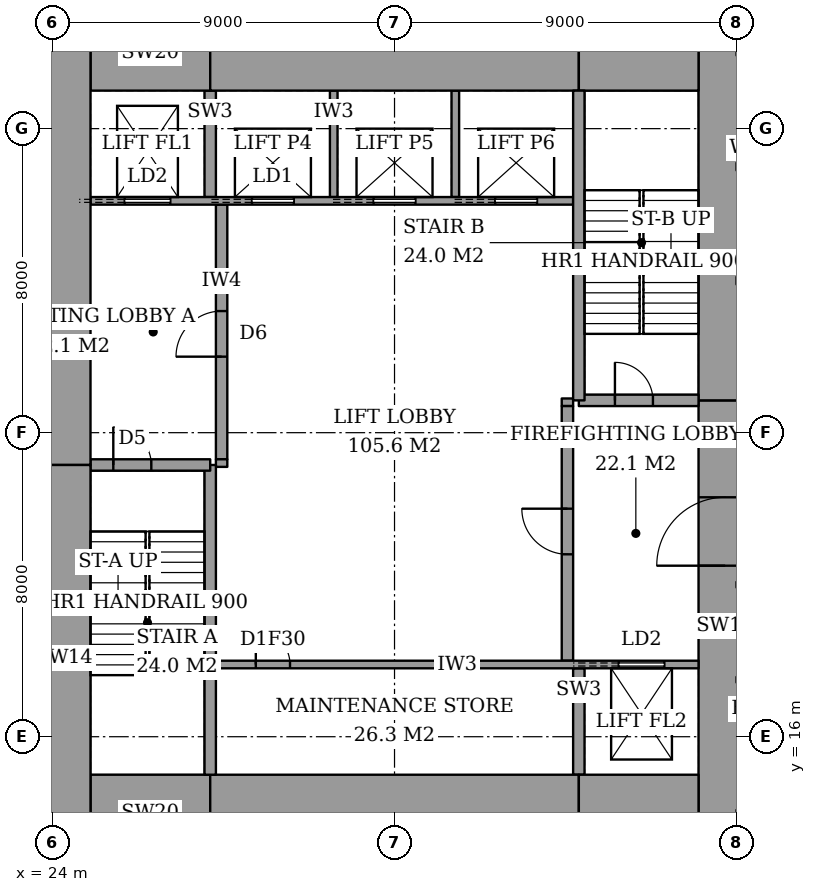
"""IFC4 building model, lengths in metres.
Left out: names, types, materials, properties, quantities, classifications, styles, units other than length and angle.
Written with IfcOpenShell. Run it as: python <this file> out.ifc"""

import sys

from ifc_helpers import new_model, si_unit, direction, frame, frame_2d, origin, place, context, subcontext, project, spatial, rectangle, extrude, element, fill, save


model = new_model("IFC4")
c1 = context("Model", 3, precision=1e-05, world=origin(), true_north=direction((0.0, 1.0)))
c2 = subcontext(c1, "Body", "Model", "MODEL_VIEW")
j1 = project(units=[si_unit("LENGTHUNIT", "METRE"), si_unit("PLANEANGLEUNIT", "RADIAN")], contexts=[c1])
p1 = place(None, origin())
s1 = spatial("IfcSite", under=j1, at=p1, CompositionType="ELEMENT")
p2 = place(p1, origin())
s2 = spatial("IfcBuilding", under=s1, at=p2, CompositionType="ELEMENT")
p3 = place(p2, frame((0.0, 0.0, 277.2)))
s3 = spatial("IfcBuildingStorey", under=s2, at=p3, CompositionType="ELEMENT", Elevation=277.2)
p4 = place(p3, frame((25.0, 14.0, 0.0), z_axis=(0.0, 0.0, 1.0), x_axis=(1.0, 0.0, 0.0)))
e1 = element("IfcWall", 1, at=p4, inside=s3, PredefinedType="SHEAR", context=c2, shape_type="SweptSolid", body=[
    extrude(rectangle(XDim=3.15, YDim=2.0, at=frame_2d((1.575, 0.0))), origin(), (0.0, 0.0, 1.0), 5.4),
])
p5 = place(p3, frame((28.15, 14.0, 0.0), z_axis=(0.0, 0.0, 1.0), x_axis=(1.0, 0.0, 0.0)))
e2 = element("IfcWall", 2, at=p5, inside=s3, PredefinedType="SHEAR", context=c2, shape_type="SweptSolid", body=[
    extrude(rectangle(XDim=9.7, YDim=2.0, at=frame_2d((4.85, 0.0))), origin(), (0.0, 0.0, 1.0), 5.4),
])
for number, where, z_axis, x_axis in (
    (3, (37.85, 14.0, 0.0), (0.0, 0.0, 1.0), (1.0, 0.0, 0.0)),
    (4, (25.0, 34.0, 0.0), (0.0, 0.0, 1.0), (1.0, 0.0, 0.0)),
):
    element("IfcWall", number, at=place(p3, frame(where, z_axis=z_axis, x_axis=x_axis)), inside=s3, PredefinedType="SHEAR", context=c2, shape_type="SweptSolid", body=[
        extrude(rectangle(XDim=3.15, YDim=2.0, at=frame_2d((1.575, 0.0))), origin(), (0.0, 0.0, 1.0), 5.4),
    ])
p6 = place(p3, frame((28.15, 34.0, 0.0), z_axis=(0.0, 0.0, 1.0), x_axis=(1.0, 0.0, 0.0)))
e5 = element("IfcWall", 5, at=p6, inside=s3, PredefinedType="SHEAR", context=c2, shape_type="SweptSolid", body=[
    extrude(rectangle(XDim=9.7, YDim=2.0, at=frame_2d((4.85, 0.0))), origin(), (0.0, 0.0, 1.0), 5.4),
])
p7 = place(p3, frame((37.85, 34.0, 0.0), z_axis=(0.0, 0.0, 1.0), x_axis=(1.0, 0.0, 0.0)))
e6 = element("IfcWall", 6, at=p7, inside=s3, PredefinedType="SHEAR", context=c2, shape_type="SweptSolid", body=[
    extrude(rectangle(XDim=3.15, YDim=2.0, at=frame_2d((1.575, 0.0))), origin(), (0.0, 0.0, 1.0), 5.4),
])
p8 = place(p3, frame((24.3, 13.0, 0.0), z_axis=(0.0, 0.0, 1.0), x_axis=(0.0, 1.0, 0.0)))
e7 = element("IfcWall", 7, at=p8, inside=s3, PredefinedType="SHEAR", context=c2, shape_type="SweptSolid", body=[
    extrude(rectangle(XDim=10.15, YDim=1.4, at=frame_2d((5.075, 0.0))), origin(), (0.0, 0.0, 1.0), 5.4),
])
p9 = place(p3, frame((24.3, 23.15, 0.0), z_axis=(0.0, 0.0, 1.0), x_axis=(0.0, 1.0, 0.0)))
e8 = element("IfcWall", 8, at=p9, inside=s3, PredefinedType="SHEAR", context=c2, shape_type="SweptSolid", body=[
    extrude(rectangle(XDim=11.85, YDim=1.4, at=frame_2d((5.925, 0.0))), origin(), (0.0, 0.0, 1.0), 5.4),
])
p10 = place(p3, frame((41.7, 13.0, 0.0), z_axis=(0.0, 0.0, 1.0), x_axis=(0.0, 1.0, 0.0)))
e9 = element("IfcWall", 9, at=p10, inside=s3, PredefinedType="SHEAR", context=c2, shape_type="SweptSolid", body=[
    extrude(rectangle(XDim=11.85, YDim=1.4, at=frame_2d((5.925, 0.0))), origin(), (0.0, 0.0, 1.0), 5.4),
])
p11 = place(p10, frame((7.5, 0.0, 0.0)))
e10 = element("IfcOpeningElement", 10, at=p11, cuts=e9, PredefinedType="OPENING", context=c2, shape_type="SweptSolid", body=[
    extrude(rectangle(XDim=1.8, YDim=2.4, at=frame_2d((0.9, 1.2))), frame((0.0, 0.71, 0.0), z_axis=(0.0, -1.0, 0.0), x_axis=(1.0, 0.0, 0.0)), (0.0, 0.0, 1.0), 1.42),
])
p12 = place(p3, frame((41.7, 24.85, 0.0), z_axis=(0.0, 0.0, 1.0), x_axis=(0.0, 1.0, 0.0)))
e11 = element("IfcWall", 11, at=p12, inside=s3, PredefinedType="SHEAR", context=c2, shape_type="SweptSolid", body=[
    extrude(rectangle(XDim=10.15, YDim=1.4, at=frame_2d((5.075, 0.0))), origin(), (0.0, 0.0, 1.0), 5.4),
])
p13 = place(p3, frame((28.15, 15.0, 0.0), z_axis=(0.0, 0.0, 1.0), x_axis=(0.0, 1.0, 0.0)))
e12 = element("IfcWall", 12, at=p13, inside=s3, PredefinedType="SHEAR", context=c2, shape_type="SweptSolid", body=[
    extrude(rectangle(XDim=8.15, YDim=0.3, at=frame_2d((4.075, 0.0))), origin(), (0.0, 0.0, 1.0), 5.4),
])
p14 = place(p3, frame((25.0, 23.15, 0.0), z_axis=(0.0, 0.0, 1.0), x_axis=(1.0, 0.0, 0.0)))
e13 = element("IfcWall", 13, at=p14, inside=s3, PredefinedType="SHEAR", context=c2, shape_type="SweptSolid", body=[
    extrude(rectangle(XDim=3.15, YDim=0.3, at=frame_2d((1.575, 0.0))), origin(), (0.0, 0.0, 1.0), 5.4),
])
p15 = place(p14, frame((0.6, 0.0, 0.0)))
e14 = element("IfcOpeningElement", 14, at=p15, cuts=e13, PredefinedType="OPENING", context=c2, shape_type="SweptSolid", body=[
    extrude(rectangle(XDim=1.0, YDim=2.1, at=frame_2d((0.5, 1.05))), frame((0.0, 0.16, 0.0), z_axis=(0.0, -1.0, 0.0), x_axis=(1.0, 0.0, 0.0)), (0.0, 0.0, 1.0), 0.32),
])
p16 = place(p3, frame((37.85, 24.85, 0.0), z_axis=(0.0, 0.0, 1.0), x_axis=(0.0, 1.0, 0.0)))
e15 = element("IfcWall", 15, at=p16, inside=s3, PredefinedType="SHEAR", context=c2, shape_type="SweptSolid", body=[
    extrude(rectangle(XDim=8.15, YDim=0.3, at=frame_2d((4.075, 0.0))), origin(), (0.0, 0.0, 1.0), 5.4),
])
p17 = place(p3, frame((37.85, 24.85, 0.0), z_axis=(0.0, 0.0, 1.0), x_axis=(1.0, 0.0, 0.0)))
e16 = element("IfcWall", 16, at=p17, inside=s3, PredefinedType="SHEAR", context=c2, shape_type="SweptSolid", body=[
    extrude(rectangle(XDim=3.15, YDim=0.3, at=frame_2d((1.575, 0.0))), origin(), (0.0, 0.0, 1.0), 5.4),
])
p18 = place(p17, frame((0.95, 0.0, 0.0)))
e17 = element("IfcOpeningElement", 17, at=p18, cuts=e16, PredefinedType="OPENING", context=c2, shape_type="SweptSolid", body=[
    extrude(rectangle(XDim=1.0, YDim=2.1, at=frame_2d((0.5, 1.05))), frame((0.0, 0.16, 0.0), z_axis=(0.0, -1.0, 0.0), x_axis=(1.0, 0.0, 0.0)), (0.0, 0.0, 1.0), 0.32),
])
p19 = place(p3, frame((28.45, 23.3, 0.0), z_axis=(0.0, 0.0, 1.0), x_axis=(0.0, 1.0, 0.0)))
e18 = element("IfcWall", 18, at=p19, inside=s3, PredefinedType="PARTITIONING", context=c2, shape_type="SweptSolid", body=[
    extrude(rectangle(XDim=6.7, YDim=0.3, at=frame_2d((3.35, 0.0))), origin(), (0.0, 0.0, 1.0), 5.4),
])
p20 = place(p19, frame((2.7, 0.0, 0.0)))
e19 = element("IfcOpeningElement", 19, at=p20, cuts=e18, PredefinedType="OPENING", context=c2, shape_type="SweptSolid", body=[
    extrude(rectangle(XDim=1.2, YDim=2.1, at=frame_2d((0.6, 1.05))), frame((0.0, 0.16, 0.0), z_axis=(0.0, -1.0, 0.0), x_axis=(1.0, 0.0, 0.0)), (0.0, 0.0, 1.0), 0.32),
])
p21 = place(p3, frame((37.55, 18.0, 0.0), z_axis=(0.0, 0.0, 1.0), x_axis=(0.0, 1.0, 0.0)))
e20 = element("IfcWall", 20, at=p21, inside=s3, PredefinedType="PARTITIONING", context=c2, shape_type="SweptSolid", body=[
    extrude(rectangle(XDim=6.7, YDim=0.3, at=frame_2d((3.35, 0.0))), origin(), (0.0, 0.0, 1.0), 5.4),
])
p22 = place(p21, frame((2.8, 0.0, 0.0)))
e21 = element("IfcOpeningElement", 21, at=p22, cuts=e20, PredefinedType="OPENING", context=c2, shape_type="SweptSolid", body=[
    extrude(rectangle(XDim=1.2, YDim=2.1, at=frame_2d((0.6, 1.05))), frame((0.0, 0.16, 0.0), z_axis=(0.0, -1.0, 0.0), x_axis=(1.0, 0.0, 0.0)), (0.0, 0.0, 1.0), 0.32),
])
p23 = place(p3, frame((28.3, 17.9, 0.0), z_axis=(0.0, 0.0, 1.0), x_axis=(1.0, 0.0, 0.0)))
e22 = element("IfcWall", 22, at=p23, inside=s3, PredefinedType="PARTITIONING", context=c2, shape_type="SweptSolid", body=[
    extrude(rectangle(XDim=12.7, YDim=0.2, at=frame_2d((6.35, 0.0))), origin(), (0.0, 0.0, 1.0), 5.4),
])
p24 = place(p23, frame((1.05, 0.0, 0.0)))
e23 = element("IfcOpeningElement", 23, at=p24, cuts=e22, PredefinedType="OPENING", context=c2, shape_type="SweptSolid", body=[
    extrude(rectangle(XDim=0.9, YDim=2.1, at=frame_2d((0.45, 1.05))), frame((0.0, 0.11, 0.0), z_axis=(0.0, -1.0, 0.0), x_axis=(1.0, 0.0, 0.0)), (0.0, 0.0, 1.0), 0.22),
])
p25 = place(p23, frame((10.6, 0.0, 0.0)))
e24 = element("IfcOpeningElement", 24, at=p25, cuts=e22, PredefinedType="OPENING", context=c2, shape_type="SweptSolid", body=[
    extrude(rectangle(XDim=1.2, YDim=2.1, at=frame_2d((0.6, 1.05))), frame((0.0, 0.11, 0.0), z_axis=(0.0, -1.0, 0.0), x_axis=(1.0, 0.0, 0.0)), (0.0, 0.0, 1.0), 0.22),
])
p26 = place(p3, frame((25.0, 30.1, 0.0), z_axis=(0.0, 0.0, 1.0), x_axis=(1.0, 0.0, 0.0)))
e25 = element("IfcWall", 25, at=p26, inside=s3, PredefinedType="PARTITIONING", context=c2, shape_type="SweptSolid", body=[
    extrude(rectangle(XDim=12.7, YDim=0.2, at=frame_2d((6.35, 0.0))), origin(), (0.0, 0.0, 1.0), 5.4),
])
p27 = place(p26, frame((4.25, 0.0, 0.0)))
e26 = element("IfcOpeningElement", 26, at=p27, cuts=e25, PredefinedType="OPENING", context=c2, shape_type="SweptSolid", body=[
    extrude(rectangle(XDim=1.1, YDim=2.1, at=frame_2d((0.55, 1.05))), frame((0.0, 0.11, 0.0), z_axis=(0.0, -1.0, 0.0), x_axis=(1.0, 0.0, 0.0)), (0.0, 0.0, 1.0), 0.22),
])
p28 = place(p26, frame((7.45, 0.0, 0.0)))
e27 = element("IfcOpeningElement", 27, at=p28, cuts=e25, PredefinedType="OPENING", context=c2, shape_type="SweptSolid", body=[
    extrude(rectangle(XDim=1.1, YDim=2.1, at=frame_2d((0.55, 1.05))), frame((0.0, 0.11, 0.0), z_axis=(0.0, -1.0, 0.0), x_axis=(1.0, 0.0, 0.0)), (0.0, 0.0, 1.0), 0.22),
])
p29 = place(p26, frame((10.65, 0.0, 0.0)))
e28 = element("IfcOpeningElement", 28, at=p29, cuts=e25, PredefinedType="OPENING", context=c2, shape_type="SweptSolid", body=[
    extrude(rectangle(XDim=1.1, YDim=2.1, at=frame_2d((0.55, 1.05))), frame((0.0, 0.11, 0.0), z_axis=(0.0, -1.0, 0.0), x_axis=(1.0, 0.0, 0.0)), (0.0, 0.0, 1.0), 0.22),
])
p30 = place(p26, frame((0.9, 0.0, 0.0)))
e29 = element("IfcOpeningElement", 29, at=p30, cuts=e25, PredefinedType="OPENING", context=c2, shape_type="SweptSolid", body=[
    extrude(rectangle(XDim=1.2, YDim=2.1, at=frame_2d((0.6, 1.05))), frame((0.0, 0.11, 0.0), z_axis=(0.0, -1.0, 0.0), x_axis=(1.0, 0.0, 0.0)), (0.0, 0.0, 1.0), 0.22),
])
p31 = place(p3, frame((37.85, 15.0, 0.0), z_axis=(0.0, 0.0, 1.0), x_axis=(0.0, 1.0, 0.0)))
e30 = element("IfcWall", 30, at=p31, inside=s3, PredefinedType="SHEAR", context=c2, shape_type="SweptSolid", body=[
    extrude(rectangle(XDim=2.8, YDim=0.3, at=frame_2d((1.4, 0.0))), origin(), (0.0, 0.0, 1.0), 5.4),
])
for number, where, z_axis, x_axis in (
    (31, (31.4, 30.2, 0.0), (0.0, 0.0, 1.0), (0.0, 1.0, 0.0)),
    (32, (34.6, 30.2, 0.0), (0.0, 0.0, 1.0), (0.0, 1.0, 0.0)),
):
    element("IfcWall", number, at=place(p3, frame(where, z_axis=z_axis, x_axis=x_axis)), inside=s3, PredefinedType="PARTITIONING", context=c2, shape_type="SweptSolid", body=[
        extrude(rectangle(XDim=2.8, YDim=0.2, at=frame_2d((1.4, 0.0))), origin(), (0.0, 0.0, 1.0), 5.4),
    ])
p32 = place(p3, frame((28.15, 30.2, 0.0), z_axis=(0.0, 0.0, 1.0), x_axis=(0.0, 1.0, 0.0)))
e33 = element("IfcWall", 33, at=p32, inside=s3, PredefinedType="SHEAR", context=c2, shape_type="SweptSolid", body=[
    extrude(rectangle(XDim=2.8, YDim=0.3, at=frame_2d((1.4, 0.0))), origin(), (0.0, 0.0, 1.0), 5.4),
])
for number, where, z_axis, x_axis in (
    (34, (28.3, 23.2, 0.0), (0.0, 0.0, 1.0), (1.0, 0.0, 0.0)),
    (35, (37.4, 24.8, 0.0), (0.0, 0.0, 1.0), (1.0, 0.0, 0.0)),
):
    element("IfcWall", number, at=place(p3, frame(where, z_axis=z_axis, x_axis=x_axis)), inside=s3, PredefinedType="PARTITIONING", context=c2, shape_type="SweptSolid", body=[
        extrude(rectangle(XDim=0.3, YDim=0.2, at=frame_2d((0.15, 0.0))), origin(), (0.0, 0.0, 1.0), 5.4),
    ])
p33 = place(p15, origin())
e36 = element("IfcDoor", 36, at=p33, inside=s3, OperationType="SINGLE_SWING_RIGHT", PredefinedType="DOOR", context=c2, shape_type="SweptSolid", body=[
    extrude(rectangle(XDim=1.0, YDim=2.1, at=frame_2d((0.5, 1.05))), frame((0.0, 0.025, 0.0), z_axis=(0.0, -1.0, 0.0), x_axis=(1.0, 0.0, 0.0)), (0.0, 0.0, 1.0), 0.05),
])
fill(e14, e36)
p34 = place(p18, origin())
e37 = element("IfcDoor", 37, at=p34, inside=s3, OperationType="SINGLE_SWING_RIGHT", PredefinedType="DOOR", context=c2, shape_type="SweptSolid", body=[
    extrude(rectangle(XDim=1.0, YDim=2.1, at=frame_2d((0.5, 1.05))), frame((0.0, 0.025, 0.0), z_axis=(0.0, -1.0, 0.0), x_axis=(1.0, 0.0, 0.0)), (0.0, 0.0, 1.0), 0.05),
])
fill(e17, e37)
p35 = place(p20, origin())
e38 = element("IfcDoor", 38, at=p35, inside=s3, OperationType="SINGLE_SWING_RIGHT", PredefinedType="DOOR", context=c2, shape_type="SweptSolid", body=[
    extrude(rectangle(XDim=1.2, YDim=2.1, at=frame_2d((0.6, 1.05))), frame((0.0, 0.025, 0.0), z_axis=(0.0, -1.0, 0.0), x_axis=(1.0, 0.0, 0.0)), (0.0, 0.0, 1.0), 0.05),
])
fill(e19, e38)
p36 = place(p22, origin())
e39 = element("IfcDoor", 39, at=p36, inside=s3, OperationType="SINGLE_SWING_LEFT", PredefinedType="DOOR", context=c2, shape_type="SweptSolid", body=[
    extrude(rectangle(XDim=1.2, YDim=2.1, at=frame_2d((0.6, 1.05))), frame((0.0, 0.025, 0.0), z_axis=(0.0, -1.0, 0.0), x_axis=(1.0, 0.0, 0.0)), (0.0, 0.0, 1.0), 0.05),
])
fill(e21, e39)
p37 = place(p11, origin())
e40 = element("IfcDoor", 40, at=p37, inside=s3, OperationType="DOUBLE_DOOR_DOUBLE_SWING", PredefinedType="DOOR", context=c2, shape_type="SweptSolid", body=[
    extrude(rectangle(XDim=1.8, YDim=2.4, at=frame_2d((0.9, 1.2))), frame((0.0, 0.025, 0.0), z_axis=(0.0, -1.0, 0.0), x_axis=(1.0, 0.0, 0.0)), (0.0, 0.0, 1.0), 0.05),
])
fill(e10, e40)
p38 = place(p24, origin())
e41 = element("IfcDoor", 41, at=p38, inside=s3, OperationType="SINGLE_SWING_RIGHT", PredefinedType="DOOR", context=c2, shape_type="SweptSolid", body=[
    extrude(rectangle(XDim=0.9, YDim=2.1, at=frame_2d((0.45, 1.05))), frame((0.0, 0.025, 0.0), z_axis=(0.0, -1.0, 0.0), x_axis=(1.0, 0.0, 0.0)), (0.0, 0.0, 1.0), 0.05),
])
fill(e23, e41)
p39 = place(p27, origin())
e42 = element("IfcDoor", 42, at=p39, inside=s3, OperationType="SLIDING_TO_LEFT", PredefinedType="DOOR", context=c2, shape_type="SweptSolid", body=[
    extrude(rectangle(XDim=1.1, YDim=2.1, at=frame_2d((0.55, 1.05))), frame((0.0, 0.025, 0.0), z_axis=(0.0, -1.0, 0.0), x_axis=(1.0, 0.0, 0.0)), (0.0, 0.0, 1.0), 0.05),
])
fill(e26, e42)
p40 = place(p28, origin())
e43 = element("IfcDoor", 43, at=p40, inside=s3, OperationType="SLIDING_TO_LEFT", PredefinedType="DOOR", context=c2, shape_type="SweptSolid", body=[
    extrude(rectangle(XDim=1.1, YDim=2.1, at=frame_2d((0.55, 1.05))), frame((0.0, 0.025, 0.0), z_axis=(0.0, -1.0, 0.0), x_axis=(1.0, 0.0, 0.0)), (0.0, 0.0, 1.0), 0.05),
])
fill(e27, e43)
p41 = place(p29, origin())
e44 = element("IfcDoor", 44, at=p41, inside=s3, OperationType="SLIDING_TO_LEFT", PredefinedType="DOOR", context=c2, shape_type="SweptSolid", body=[
    extrude(rectangle(XDim=1.1, YDim=2.1, at=frame_2d((0.55, 1.05))), frame((0.0, 0.025, 0.0), z_axis=(0.0, -1.0, 0.0), x_axis=(1.0, 0.0, 0.0)), (0.0, 0.0, 1.0), 0.05),
])
fill(e28, e44)
p42 = place(p30, origin())
e45 = element("IfcDoor", 45, at=p42, inside=s3, OperationType="SLIDING_TO_LEFT", PredefinedType="DOOR", context=c2, shape_type="SweptSolid", body=[
    extrude(rectangle(XDim=1.2, YDim=2.1, at=frame_2d((0.6, 1.05))), frame((0.0, 0.025, 0.0), z_axis=(0.0, -1.0, 0.0), x_axis=(1.0, 0.0, 0.0)), (0.0, 0.0, 1.0), 0.05),
])
fill(e29, e45)
p43 = place(p25, origin())
e46 = element("IfcDoor", 46, at=p43, inside=s3, OperationType="SLIDING_TO_LEFT", PredefinedType="DOOR", context=c2, shape_type="SweptSolid", body=[
    extrude(rectangle(XDim=1.2, YDim=2.1, at=frame_2d((0.6, 1.05))), frame((0.0, 0.025, 0.0), z_axis=(0.0, -1.0, 0.0), x_axis=(1.0, 0.0, 0.0)), (0.0, 0.0, 1.0), 0.05),
])
fill(e24, e46)
save(model, sys.argv[1])
